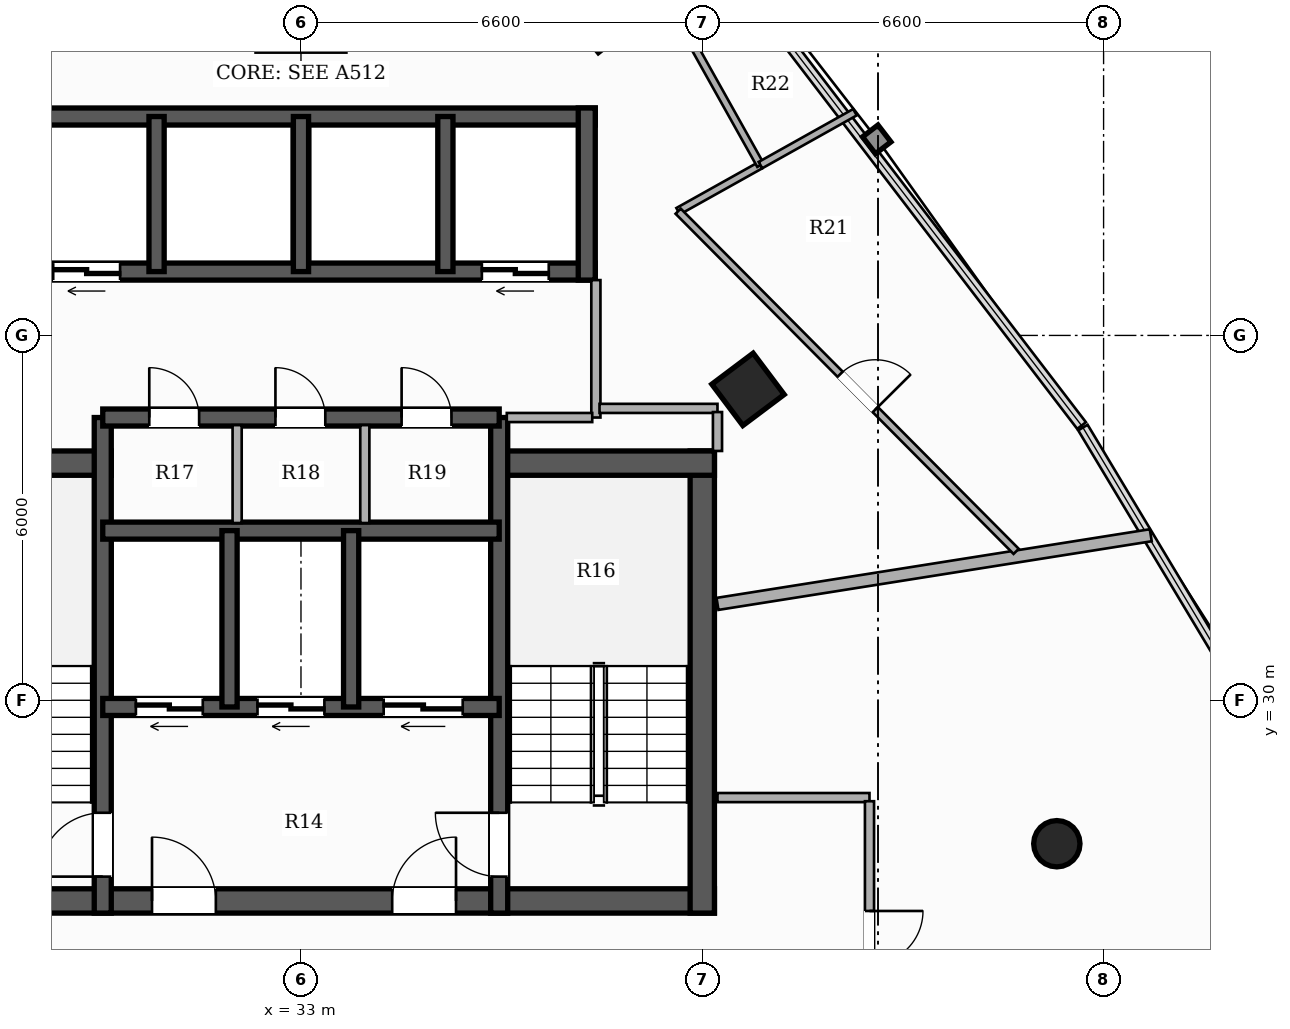
"""IFC4 building model, lengths in metres.
Left out: names, types, materials, properties, quantities, classifications, styles, units other than length and angle.
Written with IfcOpenShell. Run it as: python <this file> out.ifc"""

import sys

from ifc_helpers import new_model, si_unit, direction, frame, frame_2d, origin, origin_2d, place, context, subcontext, project, spatial, rectangle, hollow_rectangle, hollow_circle, extrude, element, fill, save


model = new_model("IFC4")
c1 = context("Model", 3, precision=1e-05, world=origin(), true_north=direction((0.0, 1.0)))
c2 = subcontext(c1, "Body", "Model", "MODEL_VIEW")
j1 = project(units=[si_unit("LENGTHUNIT", "METRE"), si_unit("PLANEANGLEUNIT", "RADIAN")], contexts=[c1])
p1 = place(None, origin())
s1 = spatial("IfcSite", under=j1, at=p1, CompositionType="ELEMENT")
p2 = place(p1, origin())
s2 = spatial("IfcBuilding", under=s1, at=p2, CompositionType="ELEMENT")
p3 = place(p2, frame((0.0, 0.0, 123.2)))
s3 = spatial("IfcBuildingStorey", under=s2, at=p3, CompositionType="ELEMENT", Elevation=123.2)
p4 = place(p3, frame((26.2, 26.7, 0.0), z_axis=(0.0, 0.0, 1.0), x_axis=(1.0, 0.0, 0.0)))
e1 = element("IfcWall", 1, at=p4, inside=s3, PredefinedType="SHEAR", context=c2, shape_type="SweptSolid", body=[
    extrude(rectangle(XDim=13.6, YDim=0.4, at=frame_2d((6.8, 0.0))), origin(), (0.0, 0.0, 1.0), 3.3),
])
p5 = place(p4, frame((4.35, 0.0, 0.0)))
e2 = element("IfcOpeningElement", 2, at=p5, cuts=e1, PredefinedType="OPENING", context=c2, shape_type="SweptSolid", body=[
    extrude(rectangle(XDim=1.05, YDim=2.15, at=frame_2d((0.525, 1.075))), frame((0.0, 0.21, 0.0), z_axis=(0.0, -1.0, 0.0), x_axis=(1.0, 0.0, 0.0)), (0.0, 0.0, 1.0), 0.42),
])
p6 = place(p4, frame((8.3, 0.0, 0.0)))
e3 = element("IfcOpeningElement", 3, at=p6, cuts=e1, PredefinedType="OPENING", context=c2, shape_type="SweptSolid", body=[
    extrude(rectangle(XDim=1.05, YDim=2.15, at=frame_2d((0.525, 1.075))), frame((0.0, 0.21, 0.0), z_axis=(0.0, -1.0, 0.0), x_axis=(1.0, 0.0, 0.0)), (0.0, 0.0, 1.0), 0.42),
])
p7 = place(p3, frame((26.2, 33.9, 0.0), z_axis=(0.0, 0.0, 1.0), x_axis=(1.0, 0.0, 0.0)))
e4 = element("IfcWall", 4, at=p7, inside=s3, PredefinedType="SHEAR", context=c2, shape_type="SweptSolid", body=[
    extrude(rectangle(XDim=3.68, YDim=0.4, at=frame_2d((1.84, 0.0))), origin(), (0.0, 0.0, 1.0), 3.3),
])
p8 = place(p3, frame((39.6, 26.5, 0.0), z_axis=(0.0, 0.0, 1.0), x_axis=(0.0, 1.0, 0.0)))
e5 = element("IfcWall", 5, at=p8, inside=s3, PredefinedType="SHEAR", context=c2, shape_type="SweptSolid", body=[
    extrude(rectangle(XDim=7.6, YDim=0.4, at=frame_2d((3.8, 0.0))), origin(), (0.0, 0.0, 1.0), 3.3),
])
p9 = place(p3, frame((36.12, 33.9, 0.0), z_axis=(0.0, 0.0, 1.0), x_axis=(1.0, 0.0, 0.0)))
e6 = element("IfcWall", 6, at=p9, inside=s3, PredefinedType="SHEAR", context=c2, shape_type="SweptSolid", body=[
    extrude(rectangle(XDim=3.68, YDim=0.4, at=frame_2d((1.84, 0.0))), origin(), (0.0, 0.0, 1.0), 3.3),
])
p10 = place(p3, frame((29.74, 26.5, 0.0), z_axis=(0.0, 0.0, 1.0), x_axis=(0.0, 1.0, 0.0)))
e7 = element("IfcWall", 7, at=p10, inside=s3, PredefinedType="SHEAR", context=c2, shape_type="SweptSolid", body=[
    extrude(rectangle(XDim=8.15, YDim=0.28, at=frame_2d((4.075, 0.0))), origin(), (0.0, 0.0, 1.0), 3.3),
])
p11 = place(p10, frame((0.6, 0.0, 0.0)))
e8 = element("IfcOpeningElement", 8, at=p11, cuts=e7, PredefinedType="OPENING", context=c2, shape_type="SweptSolid", body=[
    extrude(rectangle(XDim=1.05, YDim=2.15, at=frame_2d((0.525, 1.075))), frame((0.0, 0.15, 0.0), z_axis=(0.0, -1.0, 0.0), x_axis=(1.0, 0.0, 0.0)), (0.0, 0.0, 1.0), 0.3),
])
p12 = place(p3, frame((36.26, 26.5, 0.0), z_axis=(0.0, 0.0, 1.0), x_axis=(0.0, 1.0, 0.0)))
e9 = element("IfcWall", 9, at=p12, inside=s3, PredefinedType="SHEAR", context=c2, shape_type="SweptSolid", body=[
    extrude(rectangle(XDim=8.15, YDim=0.28, at=frame_2d((4.075, 0.0))), origin(), (0.0, 0.0, 1.0), 3.3),
])
p13 = place(p12, frame((0.6, 0.0, 0.0)))
e10 = element("IfcOpeningElement", 10, at=p13, cuts=e9, PredefinedType="OPENING", context=c2, shape_type="SweptSolid", body=[
    extrude(rectangle(XDim=1.05, YDim=2.15, at=frame_2d((0.525, 1.075))), frame((0.0, 0.15, 0.0), z_axis=(0.0, -1.0, 0.0), x_axis=(1.0, 0.0, 0.0)), (0.0, 0.0, 1.0), 0.3),
])
p14 = place(p3, frame((36.26, 29.89, 0.0), z_axis=(0.0, 0.0, 1.0), x_axis=(-1.0, 0.0, 0.0)))
e11 = element("IfcWall", 11, at=p14, inside=s3, PredefinedType="SHEAR", context=c2, shape_type="SweptSolid", body=[
    extrude(rectangle(XDim=6.52, YDim=0.28, at=frame_2d((3.26, 0.0))), origin(), (0.0, 0.0, 1.0), 3.3),
])
p15 = place(p14, frame((4.875, 0.0, 0.0)))
e12 = element("IfcOpeningElement", 12, at=p15, cuts=e11, PredefinedType="OPENING", context=c2, shape_type="SweptSolid", body=[
    extrude(rectangle(XDim=1.1, YDim=2.2, at=frame_2d((0.55, 1.1))), frame((0.0, 0.15, 0.0), z_axis=(0.0, -1.0, 0.0), x_axis=(1.0, 0.0, 0.0)), (0.0, 0.0, 1.0), 0.3),
])
p16 = place(p14, frame((2.875, 0.0, 0.0)))
e13 = element("IfcOpeningElement", 13, at=p16, cuts=e11, PredefinedType="OPENING", context=c2, shape_type="SweptSolid", body=[
    extrude(rectangle(XDim=1.1, YDim=2.2, at=frame_2d((0.55, 1.1))), frame((0.0, 0.15, 0.0), z_axis=(0.0, -1.0, 0.0), x_axis=(1.0, 0.0, 0.0)), (0.0, 0.0, 1.0), 0.3),
])
p17 = place(p14, frame((0.6, 0.0, 0.0)))
e14 = element("IfcOpeningElement", 14, at=p17, cuts=e11, PredefinedType="OPENING", context=c2, shape_type="SweptSolid", body=[
    extrude(rectangle(XDim=1.3, YDim=2.2, at=frame_2d((0.65, 1.1))), frame((0.0, 0.15, 0.0), z_axis=(0.0, -1.0, 0.0), x_axis=(1.0, 0.0, 0.0)), (0.0, 0.0, 1.0), 0.3),
])
p18 = place(p3, frame((29.74, 32.79, 0.0), z_axis=(0.0, 0.0, 1.0), x_axis=(1.0, 0.0, 0.0)))
e15 = element("IfcWall", 15, at=p18, inside=s3, PredefinedType="SHEAR", context=c2, shape_type="SweptSolid", body=[
    extrude(rectangle(XDim=6.52, YDim=0.28, at=frame_2d((3.26, 0.0))), origin(), (0.0, 0.0, 1.0), 3.3),
])
for number, where, z_axis, x_axis in (
    (16, (31.825, 29.89, 0.0), (0.0, 0.0, 1.0), (0.0, 1.0, 0.0)),
    (17, (33.825, 29.89, 0.0), (0.0, 0.0, 1.0), (0.0, 1.0, 0.0)),
):
    element("IfcWall", number, at=place(p3, frame(where, z_axis=z_axis, x_axis=x_axis)), inside=s3, PredefinedType="SHEAR", context=c2, shape_type="SweptSolid", body=[
        extrude(rectangle(XDim=2.9, YDim=0.25, at=frame_2d((1.45, 0.0))), origin(), (0.0, 0.0, 1.0), 3.3),
    ])
p19 = place(p3, frame((29.74, 34.65, 0.0), z_axis=(0.0, 0.0, 1.0), x_axis=(1.0, 0.0, 0.0)))
e18 = element("IfcWall", 18, at=p19, inside=s3, PredefinedType="SHEAR", context=c2, shape_type="SweptSolid", body=[
    extrude(rectangle(XDim=6.52, YDim=0.28, at=frame_2d((3.26, 0.0))), origin(), (0.0, 0.0, 1.0), 3.3),
])
p20 = place(p19, frame((0.765, 0.0, 0.0)))
e19 = element("IfcOpeningElement", 19, at=p20, cuts=e18, PredefinedType="OPENING", context=c2, shape_type="SweptSolid", body=[
    extrude(rectangle(XDim=0.82, YDim=2.1, at=frame_2d((0.41, 1.05))), frame((0.0, 0.15, 0.0), z_axis=(0.0, -1.0, 0.0), x_axis=(1.0, 0.0, 0.0)), (0.0, 0.0, 1.0), 0.3),
])
p21 = place(p19, frame((2.84, 0.0, 0.0)))
e20 = element("IfcOpeningElement", 20, at=p21, cuts=e18, PredefinedType="OPENING", context=c2, shape_type="SweptSolid", body=[
    extrude(rectangle(XDim=0.82, YDim=2.1, at=frame_2d((0.41, 1.05))), frame((0.0, 0.15, 0.0), z_axis=(0.0, -1.0, 0.0), x_axis=(1.0, 0.0, 0.0)), (0.0, 0.0, 1.0), 0.3),
])
p22 = place(p19, frame((4.915, 0.0, 0.0)))
e21 = element("IfcOpeningElement", 21, at=p22, cuts=e18, PredefinedType="OPENING", context=c2, shape_type="SweptSolid", body=[
    extrude(rectangle(XDim=0.82, YDim=2.1, at=frame_2d((0.41, 1.05))), frame((0.0, 0.15, 0.0), z_axis=(0.0, -1.0, 0.0), x_axis=(1.0, 0.0, 0.0)), (0.0, 0.0, 1.0), 0.3),
])
p23 = place(p3, frame((37.84, 37.05, 0.0), z_axis=(0.0, 0.0, 1.0), x_axis=(-1.0, 0.0, 0.0)))
e22 = element("IfcWall", 22, at=p23, inside=s3, PredefinedType="SHEAR", context=c2, shape_type="SweptSolid", body=[
    extrude(rectangle(XDim=9.68, YDim=0.28, at=frame_2d((4.84, 0.0))), origin(), (0.0, 0.0, 1.0), 3.3),
])
p24 = place(p23, frame((7.815, 0.0, 0.0)))
e23 = element("IfcOpeningElement", 23, at=p24, cuts=e22, PredefinedType="OPENING", context=c2, shape_type="SweptSolid", body=[
    extrude(rectangle(XDim=1.1, YDim=2.2, at=frame_2d((0.55, 1.1))), frame((0.0, 0.15, 0.0), z_axis=(0.0, -1.0, 0.0), x_axis=(1.0, 0.0, 0.0)), (0.0, 0.0, 1.0), 0.3),
])
p25 = place(p23, frame((0.765, 0.0, 0.0)))
e24 = element("IfcOpeningElement", 24, at=p25, cuts=e22, PredefinedType="OPENING", context=c2, shape_type="SweptSolid", body=[
    extrude(rectangle(XDim=1.1, YDim=2.2, at=frame_2d((0.55, 1.1))), frame((0.0, 0.15, 0.0), z_axis=(0.0, -1.0, 0.0), x_axis=(1.0, 0.0, 0.0)), (0.0, 0.0, 1.0), 0.3),
])
p26 = place(p3, frame((28.16, 39.6, 0.0), z_axis=(0.0, 0.0, 1.0), x_axis=(1.0, 0.0, 0.0)))
e25 = element("IfcWall", 25, at=p26, inside=s3, PredefinedType="SHEAR", context=c2, shape_type="SweptSolid", body=[
    extrude(rectangle(XDim=9.68, YDim=0.28, at=frame_2d((4.84, 0.0))), origin(), (0.0, 0.0, 1.0), 3.3),
])
p27 = place(p3, frame((37.7, 36.91, 0.0), z_axis=(0.0, 0.0, 1.0), x_axis=(0.0, 1.0, 0.0)))
e26 = element("IfcWall", 26, at=p27, inside=s3, PredefinedType="SHEAR", context=c2, shape_type="SweptSolid", body=[
    extrude(rectangle(XDim=2.83, YDim=0.28, at=frame_2d((1.415, 0.0))), origin(), (0.0, 0.0, 1.0), 3.3),
])
for number, where, z_axis, x_axis in (
    (27, (30.625, 37.05, 0.0), (0.0, 0.0, 1.0), (0.0, 1.0, 0.0)),
    (28, (33.0, 37.05, 0.0), (0.0, 0.0, 1.0), (0.0, 1.0, 0.0)),
    (29, (35.375, 37.05, 0.0), (0.0, 0.0, 1.0), (0.0, 1.0, 0.0)),
):
    element("IfcWall", number, at=place(p3, frame(where, z_axis=z_axis, x_axis=x_axis)), inside=s3, PredefinedType="SHEAR", context=c2, shape_type="SweptSolid", body=[
        extrude(rectangle(XDim=2.55, YDim=0.25, at=frame_2d((1.275, 0.0))), origin(), (0.0, 0.0, 1.0), 3.3),
    ])
p28 = place(p3, frame((45.431, 27.641, 0.0), z_axis=(0.0, 0.0, 1.0), x_axis=(1.0, 0.0, 0.0)))
e30 = element("IfcColumn", 30, at=p28, inside=s3, PredefinedType="COLUMN", context=c2, shape_type="SweptSolid", body=[
    extrude(hollow_circle(Radius=0.381, WallThickness=0.022, at=origin_2d()), origin(), (0.0, 0.0, 1.0), 3.3),
])
p29 = place(p3, frame((40.352, 35.113, 0.0), z_axis=(0.0, 0.0, 1.0), x_axis=(-0.600420225326, 0.799684658487, 0.0)))
e31 = element("IfcColumn", 31, at=p29, inside=s3, PredefinedType="COLUMN", context=c2, shape_type="SweptSolid", body=[
    extrude(hollow_rectangle(XDim=0.85, YDim=0.85, WallThickness=0.028, at=origin_2d()), origin(), (0.0, 0.0, 1.0), 3.3),
])
p30 = place(p3, frame((37.95, 41.178, 0.0), z_axis=(0.0, 0.0, 1.0), x_axis=(-0.623879596709, 0.781520472419, 0.0)))
e32 = element("IfcColumn", 32, at=p30, inside=s3, PredefinedType="COLUMN", context=c2, shape_type="SweptSolid", body=[
    extrude(hollow_rectangle(XDim=0.75, YDim=0.75, WallThickness=0.025, at=origin_2d()), origin(), (0.0, 0.0, 1.0), 3.3),
])
p31 = place(p3, frame((37.85, 34.65, 0.0), z_axis=(0.0, 0.0, 1.0), x_axis=(0.0, 1.0, 0.0)))
e33 = element("IfcWall", 33, at=p31, inside=s3, PredefinedType="PARTITIONING", context=c2, shape_type="SweptSolid", body=[
    extrude(rectangle(XDim=2.26, YDim=0.15, at=frame_2d((1.13, 0.0))), origin(), (0.0, 0.0, 1.0), 3.06),
])
p32 = place(p3, frame((36.385, 34.65, 0.0), z_axis=(0.0, 0.0, 1.0), x_axis=(1.0, 0.0, 0.0)))
e34 = element("IfcWall", 34, at=p32, inside=s3, PredefinedType="PARTITIONING", context=c2, shape_type="SweptSolid", body=[
    extrude(rectangle(XDim=1.405, YDim=0.15, at=frame_2d((0.703, 0.0))), origin(), (0.0, 0.0, 1.0), 2.425),
])
for number, where, z_axis, x_axis in (
    (35, (31.95, 32.915, 0.0), (0.0, 0.0, 1.0), (0.0, 1.0, 0.0)),
    (36, (34.05, 32.915, 0.0), (0.0, 0.0, 1.0), (0.0, 1.0, 0.0)),
):
    element("IfcWall", number, at=place(p3, frame(where, z_axis=z_axis, x_axis=x_axis)), inside=s3, PredefinedType="PARTITIONING", context=c2, shape_type="SweptSolid", body=[
        extrude(rectangle(XDim=1.61, YDim=0.15, at=frame_2d((0.805, 0.0))), origin(), (0.0, 0.0, 1.0), 3.06),
    ])
p33 = place(p3, frame((39.85, 28.4, 0.0), z_axis=(0.0, 0.0, 1.0), x_axis=(1.0, 0.0, 0.0)))
e37 = element("IfcWall", 37, at=p33, inside=s3, PredefinedType="PARTITIONING", context=c2, shape_type="SweptSolid", body=[
    extrude(rectangle(XDim=2.5, YDim=0.15, at=frame_2d((1.25, 0.0))), origin(), (0.0, 0.0, 1.0), 2.721),
])
p34 = place(p3, frame((42.35, 28.34, 0.0), z_axis=(0.0, 0.0, 1.0), x_axis=(0.0, -1.0, 0.0)))
e38 = element("IfcWall", 38, at=p34, inside=s3, PredefinedType="PARTITIONING", context=c2, shape_type="SweptSolid", body=[
    extrude(rectangle(XDim=4.49, YDim=0.15, at=frame_2d((2.245, 0.0))), origin(), (0.0, 0.0, 1.0), 2.721),
])
p35 = place(p34, frame((1.805, 0.0, 0.0)))
e39 = element("IfcOpeningElement", 39, at=p35, cuts=e38, PredefinedType="OPENING", context=c2, shape_type="SweptSolid", body=[
    extrude(rectangle(XDim=0.88, YDim=2.1, at=frame_2d((0.44, 1.05))), frame((0.0, 0.085, 0.0), z_axis=(0.0, -1.0, 0.0), x_axis=(1.0, 0.0, 0.0)), (0.0, 0.0, 1.0), 0.17),
])
p36 = place(p3, frame((37.91, 34.8, 0.0), z_axis=(0.0, 0.0, 1.0), x_axis=(1.0, 0.0, 0.0)))
e40 = element("IfcWall", 40, at=p36, inside=s3, PredefinedType="PARTITIONING", context=c2, shape_type="SweptSolid", body=[
    extrude(rectangle(XDim=1.94, YDim=0.15, at=frame_2d((0.97, 0.0))), origin(), (0.0, 0.0, 1.0), 2.721),
])
p37 = place(p3, frame((39.85, 34.74, 0.0), z_axis=(0.0, 0.0, 1.0), x_axis=(0.0, -1.0, 0.0)))
e41 = element("IfcWall", 41, at=p37, inside=s3, PredefinedType="PARTITIONING", context=c2, shape_type="SweptSolid", body=[
    extrude(rectangle(XDim=0.64, YDim=0.15, at=frame_2d((0.32, 0.0))), origin(), (0.0, 0.0, 1.0), 2.721),
])
p38 = place(p3, frame((46.976, 32.714, 0.0), z_axis=(0.0, 0.0, 1.0), x_axis=(-0.987677489662, -0.156502959767, 0.0)))
e42 = element("IfcWall", 42, at=p38, inside=s3, PredefinedType="PARTITIONING", context=c2, shape_type="SweptSolid", body=[
    extrude(rectangle(XDim=7.215, YDim=0.2, at=frame_2d((3.607, 0.0))), origin(), (0.0, 0.0, 1.0), 2.413),
])
p39 = place(p3, frame((40.557, 38.8, 0.0), z_axis=(0.0, 0.0, 1.0), x_axis=(-0.872825188639, -0.488032980521, 0.0)))
e43 = element("IfcWall", 43, at=p39, inside=s3, PredefinedType="PARTITIONING", context=c2, shape_type="SweptSolid", body=[
    extrude(rectangle(XDim=1.551, YDim=0.12, at=frame_2d((0.776, 0.0))), origin(), (0.0, 0.0, 1.0), 2.413),
])
p40 = place(p3, frame((39.203, 38.043, 0.0), z_axis=(0.0, 0.0, 1.0), x_axis=(0.704889894519, -0.709316739267, 0.0)))
e44 = element("IfcWall", 44, at=p40, inside=s3, PredefinedType="PARTITIONING", context=c2, shape_type="SweptSolid", body=[
    extrude(rectangle(XDim=7.886, YDim=0.12, at=frame_2d((3.943, 0.0))), origin(), (0.0, 0.0, 1.0), 2.413),
])
p41 = place(p40, frame((3.78, 0.0, 0.0)))
e45 = element("IfcOpeningElement", 45, at=p41, cuts=e44, PredefinedType="OPENING", context=c2, shape_type="SweptSolid", body=[
    extrude(rectangle(XDim=0.82, YDim=2.1, at=frame_2d((0.41, 1.05))), frame((0.0, 0.07, 0.0), z_axis=(0.0, -1.0, 0.0), x_axis=(1.0, 0.0, 0.0)), (0.0, 0.0, 1.0), 0.14),
])
p42 = place(p3, frame((35.205, 48.357, 0.0), z_axis=(0.0, 0.0, 1.0), x_axis=(0.488599975334, -0.872507916356, 0.0)))
e46 = element("IfcWall", 46, at=p42, inside=s3, PredefinedType="PARTITIONING", context=c2, shape_type="SweptSolid", body=[
    extrude(rectangle(XDim=10.953, YDim=0.12, at=frame_2d((5.477, 0.0))), origin(), (0.0, 0.0, 1.0), 2.619),
])
p43 = place(p42, frame((5.037, 0.0, 0.0)))
e47 = element("IfcOpeningElement", 47, at=p43, cuts=e46, PredefinedType="OPENING", context=c2, shape_type="SweptSolid", body=[
    extrude(rectangle(XDim=0.88, YDim=2.1, at=frame_2d((0.44, 1.05))), frame((0.0, 0.07, 0.0), z_axis=(0.0, -1.0, 0.0), x_axis=(1.0, 0.0, 0.0)), (0.0, 0.0, 1.0), 0.14),
])
p44 = place(p3, frame((40.557, 38.801, 0.0), z_axis=(0.0, 0.0, 1.0), x_axis=(0.872620527381, 0.488398828002, 0.0)))
e48 = element("IfcWall", 48, at=p44, inside=s3, PredefinedType="PARTITIONING", context=c2, shape_type="SweptSolid", body=[
    extrude(rectangle(XDim=1.781, YDim=0.12, at=frame_2d((0.891, 0.0))), origin(), (0.0, 0.0, 1.0), 3.06),
])
p45 = place(p11, origin())
e49 = element("IfcDoor", 49, at=p45, inside=s3, OperationType="SINGLE_SWING_LEFT", PredefinedType="DOOR", context=c2, shape_type="SweptSolid", body=[
    extrude(rectangle(XDim=1.05, YDim=2.15, at=frame_2d((0.525, 1.075))), frame((0.0, 0.025, 0.0), z_axis=(0.0, -1.0, 0.0), x_axis=(1.0, 0.0, 0.0)), (0.0, 0.0, 1.0), 0.05),
])
fill(e8, e49)
p46 = place(p13, origin())
e50 = element("IfcDoor", 50, at=p46, inside=s3, OperationType="SINGLE_SWING_RIGHT", PredefinedType="DOOR", context=c2, shape_type="SweptSolid", body=[
    extrude(rectangle(XDim=1.05, YDim=2.15, at=frame_2d((0.525, 1.075))), frame((0.0, 0.025, 0.0), z_axis=(0.0, -1.0, 0.0), x_axis=(1.0, 0.0, 0.0)), (0.0, 0.0, 1.0), 0.05),
])
fill(e10, e50)
p47 = place(p5, origin())
e51 = element("IfcDoor", 51, at=p47, inside=s3, OperationType="SINGLE_SWING_LEFT", PredefinedType="DOOR", context=c2, shape_type="SweptSolid", body=[
    extrude(rectangle(XDim=1.05, YDim=2.15, at=frame_2d((0.525, 1.075))), frame((0.0, 0.025, 0.0), z_axis=(0.0, -1.0, 0.0), x_axis=(1.0, 0.0, 0.0)), (0.0, 0.0, 1.0), 0.05),
])
fill(e2, e51)
p48 = place(p6, origin())
e52 = element("IfcDoor", 52, at=p48, inside=s3, OperationType="SINGLE_SWING_RIGHT", PredefinedType="DOOR", context=c2, shape_type="SweptSolid", body=[
    extrude(rectangle(XDim=1.05, YDim=2.15, at=frame_2d((0.525, 1.075))), frame((0.0, 0.025, 0.0), z_axis=(0.0, -1.0, 0.0), x_axis=(1.0, 0.0, 0.0)), (0.0, 0.0, 1.0), 0.05),
])
fill(e3, e52)
p49 = place(p15, origin())
e53 = element("IfcDoor", 53, at=p49, inside=s3, OperationType="DOUBLE_DOOR_SLIDING", PredefinedType="DOOR", context=c2, shape_type="SweptSolid", body=[
    extrude(rectangle(XDim=1.1, YDim=2.2, at=frame_2d((0.55, 1.1))), frame((0.0, 0.025, 0.0), z_axis=(0.0, -1.0, 0.0), x_axis=(1.0, 0.0, 0.0)), (0.0, 0.0, 1.0), 0.05),
])
fill(e12, e53)
p50 = place(p16, origin())
e54 = element("IfcDoor", 54, at=p50, inside=s3, OperationType="DOUBLE_DOOR_SLIDING", PredefinedType="DOOR", context=c2, shape_type="SweptSolid", body=[
    extrude(rectangle(XDim=1.1, YDim=2.2, at=frame_2d((0.55, 1.1))), frame((0.0, 0.025, 0.0), z_axis=(0.0, -1.0, 0.0), x_axis=(1.0, 0.0, 0.0)), (0.0, 0.0, 1.0), 0.05),
])
fill(e13, e54)
p51 = place(p17, origin())
e55 = element("IfcDoor", 55, at=p51, inside=s3, OperationType="DOUBLE_DOOR_SLIDING", PredefinedType="DOOR", context=c2, shape_type="SweptSolid", body=[
    extrude(rectangle(XDim=1.3, YDim=2.2, at=frame_2d((0.65, 1.1))), frame((0.0, 0.025, 0.0), z_axis=(0.0, -1.0, 0.0), x_axis=(1.0, 0.0, 0.0)), (0.0, 0.0, 1.0), 0.05),
])
fill(e14, e55)
p52 = place(p24, origin())
e56 = element("IfcDoor", 56, at=p52, inside=s3, OperationType="DOUBLE_DOOR_SLIDING", PredefinedType="DOOR", context=c2, shape_type="SweptSolid", body=[
    extrude(rectangle(XDim=1.1, YDim=2.2, at=frame_2d((0.55, 1.1))), frame((0.0, 0.025, 0.0), z_axis=(0.0, -1.0, 0.0), x_axis=(1.0, 0.0, 0.0)), (0.0, 0.0, 1.0), 0.05),
])
fill(e23, e56)
p53 = place(p25, origin())
e57 = element("IfcDoor", 57, at=p53, inside=s3, OperationType="DOUBLE_DOOR_SLIDING", PredefinedType="DOOR", context=c2, shape_type="SweptSolid", body=[
    extrude(rectangle(XDim=1.1, YDim=2.2, at=frame_2d((0.55, 1.1))), frame((0.0, 0.025, 0.0), z_axis=(0.0, -1.0, 0.0), x_axis=(1.0, 0.0, 0.0)), (0.0, 0.0, 1.0), 0.05),
])
fill(e24, e57)
p54 = place(p20, origin())
e58 = element("IfcDoor", 58, at=p54, inside=s3, OperationType="SINGLE_SWING_LEFT", PredefinedType="DOOR", context=c2, shape_type="SweptSolid", body=[
    extrude(rectangle(XDim=0.82, YDim=2.1, at=frame_2d((0.41, 1.05))), frame((0.0, 0.025, 0.0), z_axis=(0.0, -1.0, 0.0), x_axis=(1.0, 0.0, 0.0)), (0.0, 0.0, 1.0), 0.05),
])
fill(e19, e58)
p55 = place(p21, origin())
e59 = element("IfcDoor", 59, at=p55, inside=s3, OperationType="SINGLE_SWING_LEFT", PredefinedType="DOOR", context=c2, shape_type="SweptSolid", body=[
    extrude(rectangle(XDim=0.82, YDim=2.1, at=frame_2d((0.41, 1.05))), frame((0.0, 0.025, 0.0), z_axis=(0.0, -1.0, 0.0), x_axis=(1.0, 0.0, 0.0)), (0.0, 0.0, 1.0), 0.05),
])
fill(e20, e59)
p56 = place(p22, origin())
e60 = element("IfcDoor", 60, at=p56, inside=s3, OperationType="SINGLE_SWING_LEFT", PredefinedType="DOOR", context=c2, shape_type="SweptSolid", body=[
    extrude(rectangle(XDim=0.82, YDim=2.1, at=frame_2d((0.41, 1.05))), frame((0.0, 0.025, 0.0), z_axis=(0.0, -1.0, 0.0), x_axis=(1.0, 0.0, 0.0)), (0.0, 0.0, 1.0), 0.05),
])
fill(e21, e60)
p57 = place(p41, origin())
e61 = element("IfcDoor", 61, at=p57, inside=s3, OperationType="SINGLE_SWING_RIGHT", PredefinedType="DOOR", context=c2, shape_type="SweptSolid", body=[
    extrude(rectangle(XDim=0.82, YDim=2.1, at=frame_2d((0.41, 1.05))), frame((0.0, 0.025, 0.0), z_axis=(0.0, -1.0, 0.0), x_axis=(1.0, 0.0, 0.0)), (0.0, 0.0, 1.0), 0.05),
])
fill(e45, e61)
p58 = place(p35, origin())
e62 = element("IfcDoor", 62, at=p58, inside=s3, OperationType="SINGLE_SWING_LEFT", PredefinedType="DOOR", context=c2, shape_type="SweptSolid", body=[
    extrude(rectangle(XDim=0.88, YDim=2.1, at=frame_2d((0.44, 1.05))), frame((0.0, 0.025, 0.0), z_axis=(0.0, -1.0, 0.0), x_axis=(1.0, 0.0, 0.0)), (0.0, 0.0, 1.0), 0.05),
])
fill(e39, e62)
save(model, sys.argv[1])
